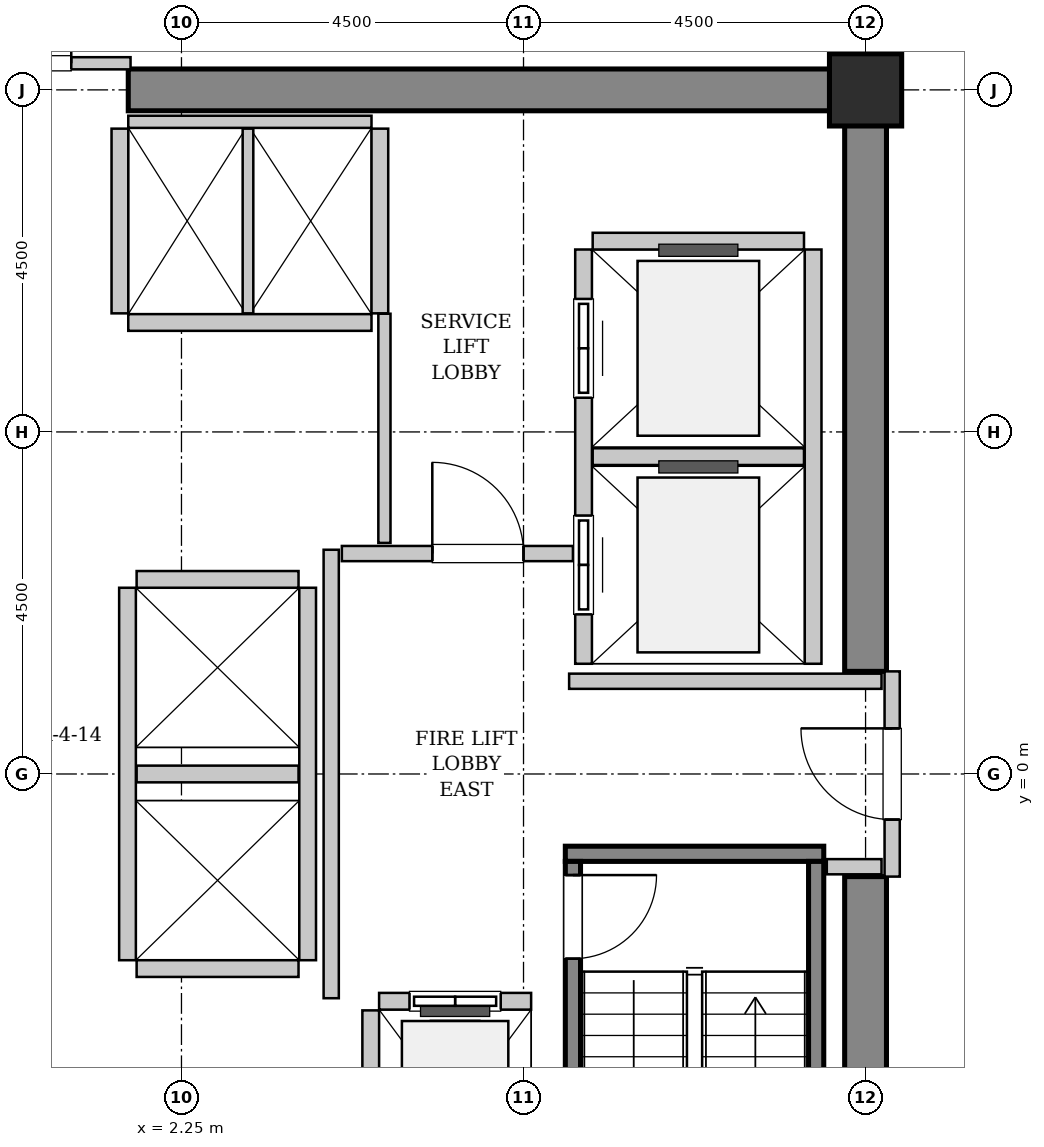
"""IFC4 building model, lengths in metres.
Left out: names, types, materials, properties, quantities, classifications, styles, units other than length and angle.
Written with IfcOpenShell. Run it as: python <this file> out.ifc"""

import sys

from ifc_helpers import new_model, si_unit, direction, frame, frame_2d, origin, origin_2d, place, context, subcontext, project, spatial, rectangle, hollow_rectangle, extrude, source, transform, mapped, element, fill, save


model = new_model("IFC4")
c1 = context("Model", 3, precision=1e-05, world=origin(), true_north=direction((0.0, 1.0)))
c2 = subcontext(c1, "Body", "Model", "MODEL_VIEW")
j1 = project(units=[si_unit("LENGTHUNIT", "METRE"), si_unit("PLANEANGLEUNIT", "RADIAN")], contexts=[c1])
p1 = place(None, origin())
s1 = spatial("IfcSite", under=j1, at=p1, CompositionType="ELEMENT")
p2 = place(p1, origin())
s2 = spatial("IfcBuilding", under=s1, at=p2, CompositionType="ELEMENT")
p3 = place(p2, frame((0.0, 0.0, 148.8)))
s3 = spatial("IfcBuildingStorey", under=s2, at=p3, CompositionType="ELEMENT", Elevation=148.8)
m1 = source(origin(), c2, "Body", "SweptSolid", [
    extrude(rectangle(XDim=9.975, YDim=0.55, at=frame_2d((4.987, 0.0))), origin(), (0.0, 0.0, 1.0), 3.8),
])
p4 = place(p3, frame((1.55, 9.0, 0.0), z_axis=(0.0, 0.0, 1.0), x_axis=(1.0, 0.0, 0.0)))
e1 = element("IfcWall", 1, at=p4, inside=s3, PredefinedType="SHEAR", context=c2, shape_type="MappedRepresentation", body=[
    mapped(m1, transform((0.0, 0.0, 0.0), x_axis=(1.0, 0.0, 0.0), y_axis=(0.0, 1.0, 0.0), z_axis=(0.0, 0.0, 1.0), scale=1.0)),
])
m2 = source(origin(), c2, "Body", "SweptSolid", [
    extrude(rectangle(XDim=7.375, YDim=0.55, at=frame_2d((3.688, 0.0))), origin(), (0.0, 0.0, 1.0), 3.8),
])
for number, where, z_axis, x_axis in (
    (2, (11.25, -8.725, 0.0), (0.0, 0.0, 1.0), (0.0, 1.0, 0.0)),
    (3, (11.25, 1.35, 0.0), (0.0, 0.0, 1.0), (0.0, 1.0, 0.0)),
):
    element("IfcWall", number, at=place(p3, frame(where, z_axis=z_axis, x_axis=x_axis)), inside=s3, PredefinedType="SHEAR", context=c2, shape_type="MappedRepresentation", body=[
        mapped(m2, transform((0.0, 0.0, 0.0), x_axis=(1.0, 0.0, 0.0), y_axis=(0.0, 1.0, 0.0), z_axis=(0.0, 0.0, 1.0), scale=1.0)),
    ])
m3 = source(origin(), c2, "Body", "SweptSolid", [
    extrude(hollow_rectangle(XDim=0.95, YDim=0.95, WallThickness=0.045, InnerFilletRadius=0.045, OuterFilletRadius=0.09, at=origin_2d()), origin(), (0.0, 0.0, 1.0), 3.8),
])
p5 = place(p3, frame((11.25, 9.0, 0.0), z_axis=(0.0, 0.0, 1.0), x_axis=(1.0, 0.0, 0.0)))
e4 = element("IfcColumn", 4, at=p5, inside=s3, PredefinedType="COLUMN", context=c2, shape_type="MappedRepresentation", body=[
    mapped(m3, transform((0.0, 0.0, 0.0), x_axis=(1.0, 0.0, 0.0), y_axis=(0.0, 1.0, 0.0), z_axis=(0.0, 0.0, 1.0), scale=1.0)),
])
m4 = source(origin(), c2, "Body", "SweptSolid", [
    extrude(rectangle(XDim=3.4, YDim=0.2, at=frame_2d((1.7, 0.0))), origin(), (0.0, 0.0, 1.0), 3.8),
])
p6 = place(p3, frame((7.3, -1.05, 0.0), z_axis=(0.0, 0.0, 1.0), x_axis=(1.0, 0.0, 0.0)))
e5 = element("IfcWall", 5, at=p6, inside=s3, PredefinedType="SOLIDWALL", context=c2, shape_type="MappedRepresentation", body=[
    mapped(m4, transform((0.0, 0.0, 0.0), x_axis=(1.0, 0.0, 0.0), y_axis=(0.0, 1.0, 0.0), z_axis=(0.0, 0.0, 1.0), scale=1.0)),
])
m5 = source(origin(), c2, "Body", "SweptSolid", [
    extrude(rectangle(XDim=7.1, YDim=0.2, at=frame_2d((3.55, 0.0))), origin(), (0.0, 0.0, 1.0), 3.8),
])
p7 = place(p3, frame((7.4, -1.15, 0.0), z_axis=(0.0, 0.0, 1.0), x_axis=(0.0, -1.0, 0.0)))
e6 = element("IfcWall", 6, at=p7, inside=s3, PredefinedType="SOLIDWALL", context=c2, shape_type="MappedRepresentation", body=[
    mapped(m5, transform((0.0, 0.0, 0.0), x_axis=(1.0, 0.0, 0.0), y_axis=(0.0, 1.0, 0.0), z_axis=(0.0, 0.0, 1.0), scale=1.0)),
])
p8 = place(p7, frame((0.18, 0.0, 0.0)))
e7 = element("IfcOpeningElement", 7, at=p8, cuts=e6, PredefinedType="OPENING", context=c2, shape_type="SweptSolid", body=[
    extrude(rectangle(XDim=1.1, YDim=2.15, at=frame_2d((0.55, 1.075))), frame((0.0, 0.11, 0.0), z_axis=(0.0, -1.0, 0.0), x_axis=(1.0, 0.0, 0.0)), (0.0, 0.0, 1.0), 0.22),
])
p9 = place(p3, frame((10.6, -1.15, 0.0), z_axis=(0.0, 0.0, 1.0), x_axis=(0.0, -1.0, 0.0)))
e8 = element("IfcWall", 8, at=p9, inside=s3, PredefinedType="SOLIDWALL", context=c2, shape_type="MappedRepresentation", body=[
    mapped(m5, transform((0.0, 0.0, 0.0), x_axis=(1.0, 0.0, 0.0), y_axis=(0.0, 1.0, 0.0), z_axis=(0.0, 0.0, 1.0), scale=1.0)),
])
m6 = source(origin(), c2, "Body", "SweptSolid", [
    extrude(rectangle(XDim=2.0, YDim=0.22, at=frame_2d((1.0, 0.0))), origin(), (0.0, 0.0, 1.0), 3.535),
])
p10 = place(p3, frame((6.85, -2.99, 0.0), z_axis=(0.0, 0.0, 1.0), x_axis=(-1.0, 0.0, 0.0)))
e9 = element("IfcWall", 9, at=p10, inside=s3, PredefinedType="SOLIDWALL", context=c2, shape_type="MappedRepresentation", body=[
    mapped(m6, transform((0.0, 0.0, 0.0), x_axis=(1.0, 0.0, 0.0), y_axis=(0.0, 1.0, 0.0), z_axis=(0.0, 0.0, 1.0), scale=1.0)),
])
p11 = place(p10, frame((0.4, 0.0, 0.0)))
e10 = element("IfcOpeningElement", 10, at=p11, cuts=e9, PredefinedType="OPENING", context=c2, shape_type="SweptSolid", body=[
    extrude(rectangle(XDim=1.2, YDim=2.2, at=frame_2d((0.6, 1.1))), frame((0.0, 0.12, 0.0), z_axis=(0.0, -1.0, 0.0), x_axis=(1.0, 0.0, 0.0)), (0.0, 0.0, 1.0), 0.24),
])
m7 = source(origin(), c2, "Body", "SweptSolid", [
    extrude(rectangle(XDim=2.68, YDim=0.22, at=frame_2d((1.34, 0.0))), origin(), (0.0, 0.0, 1.0), 3.535),
])
p12 = place(p3, frame((4.74, -3.11, 0.0), z_axis=(0.0, 0.0, 1.0), x_axis=(0.0, -1.0, 0.0)))
e11 = element("IfcWall", 11, at=p12, inside=s3, PredefinedType="SOLIDWALL", context=c2, shape_type="MappedRepresentation", body=[
    mapped(m7, transform((0.0, 0.0, 0.0), x_axis=(1.0, 0.0, 0.0), y_axis=(0.0, 1.0, 0.0), z_axis=(0.0, 0.0, 1.0), scale=1.0)),
])
m8 = source(origin(), c2, "Body", "SweptSolid", [
    extrude(rectangle(XDim=5.45, YDim=0.22, at=frame_2d((2.725, 0.0))), origin(), (0.0, 0.0, 1.0), 3.535),
])
p13 = place(p3, frame((7.54, 6.9, 0.0), z_axis=(0.0, 0.0, 1.0), x_axis=(0.0, -1.0, 0.0)))
e12 = element("IfcWall", 12, at=p13, inside=s3, PredefinedType="SOLIDWALL", context=c2, shape_type="MappedRepresentation", body=[
    mapped(m8, transform((0.0, 0.0, 0.0), x_axis=(1.0, 0.0, 0.0), y_axis=(0.0, 1.0, 0.0), z_axis=(0.0, 0.0, 1.0), scale=1.0)),
])
p14 = place(p13, frame((3.5, 0.0, 0.0)))
e13 = element("IfcOpeningElement", 13, at=p14, cuts=e12, PredefinedType="OPENING", context=c2, shape_type="SweptSolid", body=[
    extrude(rectangle(XDim=1.3, YDim=2.3, at=frame_2d((0.65, 1.15))), frame((0.0, 0.12, 0.0), z_axis=(0.0, -1.0, 0.0), x_axis=(1.0, 0.0, 0.0)), (0.0, 0.0, 1.0), 0.24),
])
p15 = place(p13, frame((0.65, 0.0, 0.0)))
e14 = element("IfcOpeningElement", 14, at=p15, cuts=e12, PredefinedType="OPENING", context=c2, shape_type="SweptSolid", body=[
    extrude(rectangle(XDim=1.3, YDim=2.3, at=frame_2d((0.65, 1.15))), frame((0.0, 0.12, 0.0), z_axis=(0.0, -1.0, 0.0), x_axis=(1.0, 0.0, 0.0)), (0.0, 0.0, 1.0), 0.24),
])
p16 = place(p3, frame((10.56, 1.45, 0.0), z_axis=(0.0, 0.0, 1.0), x_axis=(0.0, 1.0, 0.0)))
e15 = element("IfcWall", 15, at=p16, inside=s3, PredefinedType="SOLIDWALL", context=c2, shape_type="MappedRepresentation", body=[
    mapped(m8, transform((0.0, 0.0, 0.0), x_axis=(1.0, 0.0, 0.0), y_axis=(0.0, 1.0, 0.0), z_axis=(0.0, 0.0, 1.0), scale=1.0)),
])
m9 = source(origin(), c2, "Body", "SweptSolid", [
    extrude(rectangle(XDim=2.78, YDim=0.22, at=frame_2d((1.39, 0.0))), origin(), (0.0, 0.0, 1.0), 3.535),
])
for number, where, z_axis, x_axis in (
    (16, (7.66, 4.175, 0.0), (0.0, 0.0, 1.0), (1.0, 0.0, 0.0)),
    (17, (10.44, 7.01, 0.0), (0.0, 0.0, 1.0), (-1.0, 0.0, 0.0)),
):
    element("IfcWall", number, at=place(p3, frame(where, z_axis=z_axis, x_axis=x_axis)), inside=s3, PredefinedType="SOLIDWALL", context=c2, shape_type="MappedRepresentation", body=[
        mapped(m9, transform((0.0, 0.0, 0.0), x_axis=(1.0, 0.0, 0.0), y_axis=(0.0, 1.0, 0.0), z_axis=(0.0, 0.0, 1.0), scale=1.0)),
    ])
m10 = source(origin(), c2, "Body", "SweptSolid", [
    extrude(rectangle(XDim=3.2, YDim=0.22, at=frame_2d((1.6, 0.0))), origin(), (0.0, 0.0, 1.0), 3.535),
])
p17 = place(p3, frame((1.55, 5.94, 0.0), z_axis=(0.0, 0.0, 1.0), x_axis=(1.0, 0.0, 0.0)))
e18 = element("IfcWall", 18, at=p17, inside=s3, PredefinedType="SOLIDWALL", context=c2, shape_type="MappedRepresentation", body=[
    mapped(m10, transform((0.0, 0.0, 0.0), x_axis=(1.0, 0.0, 0.0), y_axis=(0.0, 1.0, 0.0), z_axis=(0.0, 0.0, 1.0), scale=1.0)),
])
m11 = source(origin(), c2, "Body", "SweptSolid", [
    extrude(rectangle(XDim=3.2, YDim=0.16, at=frame_2d((1.6, 0.0))), origin(), (0.0, 0.0, 1.0), 2.425),
])
p18 = place(p3, frame((4.75, 8.58, 0.0), z_axis=(0.0, 0.0, 1.0), x_axis=(-1.0, 0.0, 0.0)))
e19 = element("IfcWall", 19, at=p18, inside=s3, PredefinedType="PARTITIONING", context=c2, shape_type="MappedRepresentation", body=[
    mapped(m11, transform((0.0, 0.0, 0.0), x_axis=(1.0, 0.0, 0.0), y_axis=(0.0, 1.0, 0.0), z_axis=(0.0, 0.0, 1.0), scale=1.0)),
])
m12 = source(origin(), c2, "Body", "SweptSolid", [
    extrude(rectangle(XDim=2.43, YDim=0.22, at=frame_2d((1.215, 0.0))), origin(), (0.0, 0.0, 1.0), 3.535),
])
p19 = place(p3, frame((1.44, 8.49, 0.0), z_axis=(0.0, 0.0, 1.0), x_axis=(0.0, -1.0, 0.0)))
e20 = element("IfcWall", 20, at=p19, inside=s3, PredefinedType="SOLIDWALL", context=c2, shape_type="MappedRepresentation", body=[
    mapped(m12, transform((0.0, 0.0, 0.0), x_axis=(1.0, 0.0, 0.0), y_axis=(0.0, 1.0, 0.0), z_axis=(0.0, 0.0, 1.0), scale=1.0)),
])
m13 = source(origin(), c2, "Body", "SweptSolid", [
    extrude(rectangle(XDim=2.43, YDim=0.14, at=frame_2d((1.215, 0.0))), origin(), (0.0, 0.0, 1.0), 3.535),
])
p20 = place(p3, frame((3.125, 6.06, 0.0), z_axis=(0.0, 0.0, 1.0), x_axis=(0.0, 1.0, 0.0)))
e21 = element("IfcWall", 21, at=p20, inside=s3, PredefinedType="PARTITIONING", context=c2, shape_type="MappedRepresentation", body=[
    mapped(m13, transform((0.0, 0.0, 0.0), x_axis=(1.0, 0.0, 0.0), y_axis=(0.0, 1.0, 0.0), z_axis=(0.0, 0.0, 1.0), scale=1.0)),
])
p21 = place(p3, frame((4.86, 6.06, 0.0), z_axis=(0.0, 0.0, 1.0), x_axis=(0.0, 1.0, 0.0)))
e22 = element("IfcWall", 22, at=p21, inside=s3, PredefinedType="SOLIDWALL", context=c2, shape_type="MappedRepresentation", body=[
    mapped(m12, transform((0.0, 0.0, 0.0), x_axis=(1.0, 0.0, 0.0), y_axis=(0.0, 1.0, 0.0), z_axis=(0.0, 0.0, 1.0), scale=1.0)),
])
m14 = source(origin(), c2, "Body", "SweptSolid", [
    extrude(rectangle(XDim=4.9, YDim=0.22, at=frame_2d((2.45, 0.0))), origin(), (0.0, 0.0, 1.0), 3.535),
])
for number, where, z_axis, x_axis in (
    (23, (1.54, 2.45, 0.0), (0.0, 0.0, 1.0), (0.0, -1.0, 0.0)),
    (24, (3.91, -2.45, 0.0), (0.0, 0.0, 1.0), (0.0, 1.0, 0.0)),
):
    element("IfcWall", number, at=place(p3, frame(where, z_axis=z_axis, x_axis=x_axis)), inside=s3, PredefinedType="SOLIDWALL", context=c2, shape_type="MappedRepresentation", body=[
        mapped(m14, transform((0.0, 0.0, 0.0), x_axis=(1.0, 0.0, 0.0), y_axis=(0.0, 1.0, 0.0), z_axis=(0.0, 0.0, 1.0), scale=1.0)),
    ])
m15 = source(origin(), c2, "Body", "SweptSolid", [
    extrude(rectangle(XDim=2.13, YDim=0.22, at=frame_2d((1.065, 0.0))), origin(), (0.0, 0.0, 1.0), 3.535),
])
for number, where, z_axis, x_axis in (
    (25, (1.66, -2.56, 0.0), (0.0, 0.0, 1.0), (1.0, 0.0, 0.0)),
    (26, (1.66, 0.0, 0.0), (0.0, 0.0, 1.0), (1.0, 0.0, 0.0)),
    (27, (3.79, 2.56, 0.0), (0.0, 0.0, 1.0), (-1.0, 0.0, 0.0)),
):
    element("IfcWall", number, at=place(p3, frame(where, z_axis=z_axis, x_axis=x_axis)), inside=s3, PredefinedType="SOLIDWALL", context=c2, shape_type="MappedRepresentation", body=[
        mapped(m15, transform((0.0, 0.0, 0.0), x_axis=(1.0, 0.0, 0.0), y_axis=(0.0, 1.0, 0.0), z_axis=(0.0, 0.0, 1.0), scale=1.0)),
    ])
m16 = source(origin(), c2, "Body", "SweptSolid", [
    extrude(rectangle(XDim=2.7, YDim=0.2, at=frame_2d((1.35, 0.0))), origin(), (0.0, 0.0, 1.0), 2.425),
])
p22 = place(p3, frame((11.6, -1.35, 0.0), z_axis=(0.0, 0.0, 1.0), x_axis=(0.0, 1.0, 0.0)))
e28 = element("IfcWall", 28, at=p22, inside=s3, PredefinedType="PARTITIONING", context=c2, shape_type="MappedRepresentation", body=[
    mapped(m16, transform((0.0, 0.0, 0.0), x_axis=(1.0, 0.0, 0.0), y_axis=(0.0, 1.0, 0.0), z_axis=(0.0, 0.0, 1.0), scale=1.0)),
])
p23 = place(p22, frame((0.75, 0.0, 0.0)))
e29 = element("IfcOpeningElement", 29, at=p23, cuts=e28, PredefinedType="OPENING", context=c2, shape_type="SweptSolid", body=[
    extrude(rectangle(XDim=1.2, YDim=2.15, at=frame_2d((0.6, 1.075))), frame((0.0, 0.11, 0.0), z_axis=(0.0, -1.0, 0.0), x_axis=(1.0, 0.0, 0.0)), (0.0, 0.0, 1.0), 0.22),
])
m17 = source(origin(), c2, "Body", "SweptSolid", [
    extrude(rectangle(XDim=5.9, YDim=0.2, at=frame_2d((2.95, 0.0))), origin(), (0.0, 0.0, 1.0), 3.535),
])
p24 = place(p3, frame((4.22, -2.95, 0.0), z_axis=(0.0, 0.0, 1.0), x_axis=(0.0, 1.0, 0.0)))
e30 = element("IfcWall", 30, at=p24, inside=s3, PredefinedType="PARTITIONING", context=c2, shape_type="MappedRepresentation", body=[
    mapped(m17, transform((0.0, 0.0, 0.0), x_axis=(1.0, 0.0, 0.0), y_axis=(0.0, 1.0, 0.0), z_axis=(0.0, 0.0, 1.0), scale=1.0)),
])
m18 = source(origin(), c2, "Body", "SweptSolid", [
    extrude(rectangle(XDim=3.04, YDim=0.2, at=frame_2d((1.52, 0.0))), origin(), (0.0, 0.0, 1.0), 3.535),
])
p25 = place(p3, frame((4.36, 2.9, 0.0), z_axis=(0.0, 0.0, 1.0), x_axis=(1.0, 0.0, 0.0)))
e31 = element("IfcWall", 31, at=p25, inside=s3, PredefinedType="PARTITIONING", context=c2, shape_type="MappedRepresentation", body=[
    mapped(m18, transform((0.0, 0.0, 0.0), x_axis=(1.0, 0.0, 0.0), y_axis=(0.0, 1.0, 0.0), z_axis=(0.0, 0.0, 1.0), scale=1.0)),
])
p26 = place(p25, frame((1.19, 0.0, 0.0)))
e32 = element("IfcOpeningElement", 32, at=p26, cuts=e31, PredefinedType="OPENING", context=c2, shape_type="SweptSolid", body=[
    extrude(rectangle(XDim=1.2, YDim=2.15, at=frame_2d((0.6, 1.075))), frame((0.0, 0.11, 0.0), z_axis=(0.0, -1.0, 0.0), x_axis=(1.0, 0.0, 0.0)), (0.0, 0.0, 1.0), 0.22),
])
m19 = source(origin(), c2, "Body", "SweptSolid", [
    extrude(rectangle(XDim=4.11, YDim=0.2, at=frame_2d((2.055, 0.0))), origin(), (0.0, 0.0, 1.0), 3.535),
])
p27 = place(p3, frame((7.35, 1.22, 0.0), z_axis=(0.0, 0.0, 1.0), x_axis=(1.0, 0.0, 0.0)))
e33 = element("IfcWall", 33, at=p27, inside=s3, PredefinedType="PARTITIONING", context=c2, shape_type="MappedRepresentation", body=[
    mapped(m19, transform((0.0, 0.0, 0.0), x_axis=(1.0, 0.0, 0.0), y_axis=(0.0, 1.0, 0.0), z_axis=(0.0, 0.0, 1.0), scale=1.0)),
])
m20 = source(origin(), c2, "Body", "SweptSolid", [
    extrude(rectangle(XDim=0.72, YDim=0.2, at=frame_2d((0.36, 0.0))), origin(), (0.0, 0.0, 1.0), 3.535),
])
p28 = place(p3, frame((10.74, -1.22, 0.0), z_axis=(0.0, 0.0, 1.0), x_axis=(1.0, 0.0, 0.0)))
e34 = element("IfcWall", 34, at=p28, inside=s3, PredefinedType="PARTITIONING", context=c2, shape_type="MappedRepresentation", body=[
    mapped(m20, transform((0.0, 0.0, 0.0), x_axis=(1.0, 0.0, 0.0), y_axis=(0.0, 1.0, 0.0), z_axis=(0.0, 0.0, 1.0), scale=1.0)),
])
m21 = source(origin(), c2, "Body", "SweptSolid", [
    extrude(rectangle(XDim=3.16, YDim=0.16, at=frame_2d((1.58, 0.0))), origin(), (0.0, 0.0, 1.0), 2.425),
])
p29 = place(p3, frame((-1.58, 9.35, 0.0), z_axis=(0.0, 0.0, 1.0), x_axis=(1.0, 0.0, 0.0)))
e35 = element("IfcWall", 35, at=p29, inside=s3, PredefinedType="PARTITIONING", context=c2, shape_type="MappedRepresentation", body=[
    mapped(m21, transform((0.0, 0.0, 0.0), x_axis=(1.0, 0.0, 0.0), y_axis=(0.0, 1.0, 0.0), z_axis=(0.0, 0.0, 1.0), scale=1.0)),
])
p30 = place(p29, frame((0.78, 0.0, 0.0)))
e36 = element("IfcOpeningElement", 36, at=p30, cuts=e35, PredefinedType="OPENING", context=c2, shape_type="SweptSolid", body=[
    extrude(rectangle(XDim=1.6, YDim=2.3, at=frame_2d((0.8, 1.15))), frame((0.0, 0.09, 0.0), z_axis=(0.0, -1.0, 0.0), x_axis=(1.0, 0.0, 0.0)), (0.0, 0.0, 1.0), 0.18),
])
m22 = source(origin(), c2, "Body", "SweptSolid", [
    extrude(rectangle(XDim=3.015, YDim=0.16, at=frame_2d((1.507, 0.0))), origin(), (0.0, 0.0, 1.0), 3.535),
])
p31 = place(p3, frame((4.92, 3.04, 0.0), z_axis=(0.0, 0.0, 1.0), x_axis=(0.0, 1.0, 0.0)))
e37 = element("IfcWall", 37, at=p31, inside=s3, PredefinedType="PARTITIONING", context=c2, shape_type="MappedRepresentation", body=[
    mapped(m22, transform((0.0, 0.0, 0.0), x_axis=(1.0, 0.0, 0.0), y_axis=(0.0, 1.0, 0.0), z_axis=(0.0, 0.0, 1.0), scale=1.0)),
])
m23 = source(origin(), c2, "Body", "SweptSolid", [
    extrude(rectangle(XDim=1.1, YDim=2.15, at=frame_2d((0.55, 1.075))), frame((0.0, 0.025, 0.0), z_axis=(0.0, -1.0, 0.0), x_axis=(1.0, 0.0, 0.0)), (0.0, 0.0, 1.0), 0.05),
])
p32 = place(p8, origin())
e38 = element("IfcDoor", 38, at=p32, inside=s3, OperationType="SINGLE_SWING_LEFT", PredefinedType="DOOR", context=c2, shape_type="MappedRepresentation", body=[
    mapped(m23, transform((0.0, 0.0, 0.0), x_axis=(1.0, 0.0, 0.0), y_axis=(0.0, 1.0, 0.0), z_axis=(0.0, 0.0, 1.0), scale=1.0)),
])
fill(e7, e38)
m24 = source(origin(), c2, "Body", "SweptSolid", [
    extrude(rectangle(XDim=1.2, YDim=2.2, at=frame_2d((0.6, 1.1))), frame((0.0, 0.025, 0.0), z_axis=(0.0, -1.0, 0.0), x_axis=(1.0, 0.0, 0.0)), (0.0, 0.0, 1.0), 0.05),
])
p33 = place(p11, origin())
e39 = element("IfcDoor", 39, at=p33, inside=s3, OperationType="SLIDING_TO_LEFT", PredefinedType="DOOR", context=c2, shape_type="MappedRepresentation", body=[
    mapped(m24, transform((0.0, 0.0, 0.0), x_axis=(1.0, 0.0, 0.0), y_axis=(0.0, 1.0, 0.0), z_axis=(0.0, 0.0, 1.0), scale=1.0)),
])
fill(e10, e39)
m25 = source(origin(), c2, "Body", "SweptSolid", [
    extrude(rectangle(XDim=1.3, YDim=2.3, at=frame_2d((0.65, 1.15))), frame((0.0, 0.025, 0.0), z_axis=(0.0, -1.0, 0.0), x_axis=(1.0, 0.0, 0.0)), (0.0, 0.0, 1.0), 0.05),
])
p34 = place(p14, origin())
e40 = element("IfcDoor", 40, at=p34, inside=s3, OperationType="SLIDING_TO_RIGHT", PredefinedType="DOOR", context=c2, shape_type="MappedRepresentation", body=[
    mapped(m25, transform((0.0, 0.0, 0.0), x_axis=(1.0, 0.0, 0.0), y_axis=(0.0, 1.0, 0.0), z_axis=(0.0, 0.0, 1.0), scale=1.0)),
])
fill(e13, e40)
p35 = place(p15, origin())
e41 = element("IfcDoor", 41, at=p35, inside=s3, OperationType="SLIDING_TO_RIGHT", PredefinedType="DOOR", context=c2, shape_type="MappedRepresentation", body=[
    mapped(m25, transform((0.0, 0.0, 0.0), x_axis=(1.0, 0.0, 0.0), y_axis=(0.0, 1.0, 0.0), z_axis=(0.0, 0.0, 1.0), scale=1.0)),
])
fill(e14, e41)
m26 = source(origin(), c2, "Body", "SweptSolid", [
    extrude(rectangle(XDim=1.2, YDim=2.15, at=frame_2d((0.6, 1.075))), frame((0.0, 0.025, 0.0), z_axis=(0.0, -1.0, 0.0), x_axis=(1.0, 0.0, 0.0)), (0.0, 0.0, 1.0), 0.05),
])
p36 = place(p23, origin())
e42 = element("IfcDoor", 42, at=p36, inside=s3, OperationType="SINGLE_SWING_RIGHT", PredefinedType="DOOR", context=c2, shape_type="MappedRepresentation", body=[
    mapped(m26, transform((0.0, 0.0, 0.0), x_axis=(1.0, 0.0, 0.0), y_axis=(0.0, 1.0, 0.0), z_axis=(0.0, 0.0, 1.0), scale=1.0)),
])
fill(e29, e42)
p37 = place(p26, origin())
e43 = element("IfcDoor", 43, at=p37, inside=s3, OperationType="SINGLE_SWING_LEFT", PredefinedType="DOOR", context=c2, shape_type="MappedRepresentation", body=[
    mapped(m26, transform((0.0, 0.0, 0.0), x_axis=(1.0, 0.0, 0.0), y_axis=(0.0, 1.0, 0.0), z_axis=(0.0, 0.0, 1.0), scale=1.0)),
])
fill(e32, e43)
m27 = source(origin(), c2, "Body", "SweptSolid", [
    extrude(rectangle(XDim=1.6, YDim=2.3, at=frame_2d((0.8, 1.15))), frame((0.0, 0.025, 0.0), z_axis=(0.0, -1.0, 0.0), x_axis=(1.0, 0.0, 0.0)), (0.0, 0.0, 1.0), 0.05),
])
p38 = place(p30, origin())
e44 = element("IfcDoor", 44, at=p38, inside=s3, OperationType="DOUBLE_DOOR_SINGLE_SWING", PredefinedType="DOOR", context=c2, shape_type="MappedRepresentation", body=[
    mapped(m27, transform((0.0, 0.0, 0.0), x_axis=(1.0, 0.0, 0.0), y_axis=(0.0, 1.0, 0.0), z_axis=(0.0, 0.0, 1.0), scale=1.0)),
])
fill(e36, e44)
save(model, sys.argv[1])
